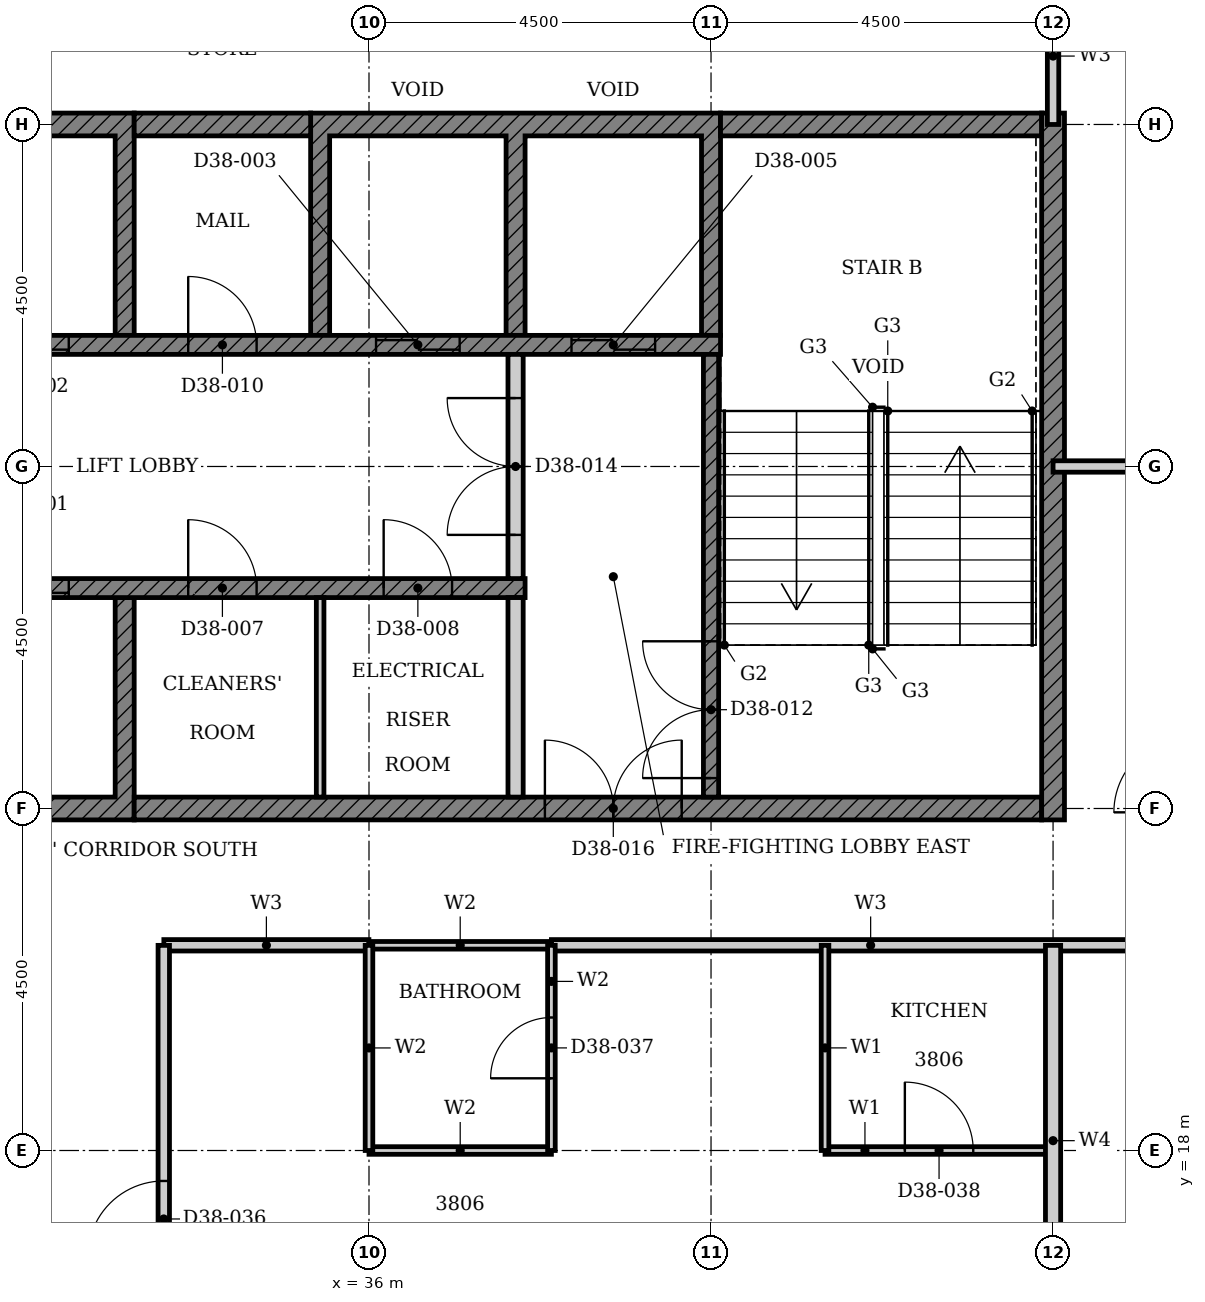
"""IFC4 building model, lengths in metres.
Left out: names, types, materials, properties, quantities, classifications, styles, units other than length and angle.
Written with IfcOpenShell. Run it as: python <this file> out.ifc"""

import sys

from ifc_helpers import new_model, si_unit, direction, frame, frame_2d, origin, place, context, subcontext, project, spatial, polyline, rectangle, outline, extrude, element, fill, save


model = new_model("IFC4")
c1 = context("Model", 3, precision=1e-05, world=origin(), true_north=direction((0.0, 1.0)))
c2 = subcontext(c1, "Body", "Model", "MODEL_VIEW")
j1 = project(units=[si_unit("LENGTHUNIT", "METRE"), si_unit("PLANEANGLEUNIT", "RADIAN")], contexts=[c1])
p1 = place(None, origin())
s1 = spatial("IfcSite", under=j1, at=p1, CompositionType="ELEMENT")
p2 = place(p1, origin())
s2 = spatial("IfcBuilding", under=s1, at=p2, CompositionType="ELEMENT")
p3 = place(p2, frame((0.0, 0.0, 154.3)))
s3 = spatial("IfcBuildingStorey", under=s2, at=p3, CompositionType="ELEMENT", Elevation=154.3)
p4 = place(p3, origin())
e1 = element("IfcWall", 1, at=p4, inside=s3, PredefinedType="SHEAR", context=c2, shape_type="SweptSolid", body=[
    extrude(outline(polyline([(27.518, 22.35), (32.911, 22.35), (32.911, 25.275), (32.661, 25.275), (32.661, 22.65), (30.339, 22.65), (30.339, 25.275), (30.089, 25.275), (30.089, 22.65), (27.768, 22.65), (27.768, 25.275), (27.518, 25.275), (27.518, 22.35)])), origin(), (0.0, 0.0, 1.0), 3.4),
])
p5 = place(p3, origin())
e2 = element("IfcWall", 2, at=p5, inside=s3, PredefinedType="SHEAR", context=c2, shape_type="SweptSolid", body=[
    extrude(outline(polyline([(27.518, 28.725), (27.768, 28.725), (27.768, 31.35), (30.089, 31.35), (30.089, 28.725), (30.339, 28.725), (30.339, 31.35), (32.661, 31.35), (32.661, 28.725), (32.911, 28.725), (32.911, 31.65), (27.518, 31.65), (27.518, 28.725)])), origin(), (0.0, 0.0, 1.0), 3.4),
])
p6 = place(p3, origin())
e3 = element("IfcWall", 3, at=p6, inside=s3, PredefinedType="SHEAR", context=c2, shape_type="SweptSolid", body=[
    extrude(outline(polyline([(35.232, 28.725), (35.482, 28.725), (35.482, 31.35), (37.803, 31.35), (37.803, 28.725), (38.053, 28.725), (38.053, 31.35), (40.375, 31.35), (40.375, 28.725), (40.625, 28.725), (40.625, 31.65), (35.232, 31.65), (35.232, 28.725)])), origin(), (0.0, 0.0, 1.0), 3.4),
])
p7 = place(p3, frame((32.911, 22.5, 0.0), z_axis=(0.0, 0.0, 1.0), x_axis=(1.0, 0.0, 0.0)))
e4 = element("IfcWall", 4, at=p7, inside=s3, PredefinedType="SHEAR", context=c2, shape_type="SweptSolid", body=[
    extrude(rectangle(XDim=11.939, YDim=0.3, at=frame_2d((5.97, 0.0))), origin(), (0.0, 0.0, 1.0), 3.4),
])
p8 = place(p7, frame((5.404, 0.0, 0.0)))
e5 = element("IfcOpeningElement", 5, at=p8, cuts=e4, PredefinedType="OPENING", context=c2, shape_type="SweptSolid", body=[
    extrude(rectangle(XDim=1.8, YDim=2.1, at=frame_2d((0.9, 1.05))), frame((0.0, 0.16, 0.0), z_axis=(0.0, -1.0, 0.0), x_axis=(1.0, 0.0, 0.0)), (0.0, 0.0, 1.0), 0.32),
])
p9 = place(p3, frame((32.911, 31.5, 0.0), z_axis=(0.0, 0.0, 1.0), x_axis=(1.0, 0.0, 0.0)))
e6 = element("IfcWall", 6, at=p9, inside=s3, PredefinedType="SHEAR", context=c2, shape_type="SweptSolid", body=[
    extrude(rectangle(XDim=2.322, YDim=0.3, at=frame_2d((1.161, 0.0))), origin(), (0.0, 0.0, 1.0), 3.4),
])
p10 = place(p3, frame((40.625, 31.5, 0.0), z_axis=(0.0, 0.0, 1.0), x_axis=(1.0, 0.0, 0.0)))
e7 = element("IfcWall", 7, at=p10, inside=s3, PredefinedType="SHEAR", context=c2, shape_type="SweptSolid", body=[
    extrude(rectangle(XDim=4.225, YDim=0.3, at=frame_2d((2.113, 0.0))), origin(), (0.0, 0.0, 1.0), 3.4),
])
p11 = place(p3, frame((45.0, 22.35, 0.0), z_axis=(0.0, 0.0, 1.0), x_axis=(0.0, 1.0, 0.0)))
e8 = element("IfcWall", 8, at=p11, inside=s3, PredefinedType="SHEAR", context=c2, shape_type="SweptSolid", body=[
    extrude(rectangle(XDim=9.3, YDim=0.3, at=frame_2d((4.65, 0.0))), origin(), (0.0, 0.0, 1.0), 3.4),
])
p12 = place(p3, frame((22.375, 25.4, 0.0), z_axis=(0.0, 0.0, 1.0), x_axis=(1.0, 0.0, 0.0)))
e9 = element("IfcWall", 9, at=p12, inside=s3, PredefinedType="SHEAR", context=c2, shape_type="SweptSolid", body=[
    extrude(rectangle(XDim=15.678, YDim=0.25, at=frame_2d((7.839, 0.0))), origin(), (0.0, 0.0, 1.0), 3.4),
])
p13 = place(p12, frame((8.575, 0.0, 0.0)))
e10 = element("IfcOpeningElement", 10, at=p13, cuts=e9, PredefinedType="OPENING", context=c2, shape_type="SweptSolid", body=[
    extrude(rectangle(XDim=1.1, YDim=2.1, at=frame_2d((0.55, 1.05))), frame((0.0, 0.135, 0.0), z_axis=(0.0, -1.0, 0.0), x_axis=(1.0, 0.0, 0.0)), (0.0, 0.0, 1.0), 0.27),
])
p14 = place(p12, frame((0.861, 0.0, 0.0)))
e11 = element("IfcOpeningElement", 11, at=p14, cuts=e9, PredefinedType="OPENING", context=c2, shape_type="SweptSolid", body=[
    extrude(rectangle(XDim=1.1, YDim=2.1, at=frame_2d((0.55, 1.05))), frame((0.0, 0.135, 0.0), z_axis=(0.0, -1.0, 0.0), x_axis=(1.0, 0.0, 0.0)), (0.0, 0.0, 1.0), 0.27),
])
p15 = place(p12, frame((3.532, 0.0, 0.0)))
e12 = element("IfcOpeningElement", 12, at=p15, cuts=e9, PredefinedType="OPENING", context=c2, shape_type="SweptSolid", body=[
    extrude(rectangle(XDim=0.9, YDim=2.1, at=frame_2d((0.45, 1.05))), frame((0.0, 0.135, 0.0), z_axis=(0.0, -1.0, 0.0), x_axis=(1.0, 0.0, 0.0)), (0.0, 0.0, 1.0), 0.27),
])
p16 = place(p12, frame((11.246, 0.0, 0.0)))
e13 = element("IfcOpeningElement", 13, at=p16, cuts=e9, PredefinedType="OPENING", context=c2, shape_type="SweptSolid", body=[
    extrude(rectangle(XDim=0.9, YDim=2.1, at=frame_2d((0.45, 1.05))), frame((0.0, 0.135, 0.0), z_axis=(0.0, -1.0, 0.0), x_axis=(1.0, 0.0, 0.0)), (0.0, 0.0, 1.0), 0.27),
])
p17 = place(p12, frame((13.818, 0.0, 0.0)))
e14 = element("IfcOpeningElement", 14, at=p17, cuts=e9, PredefinedType="OPENING", context=c2, shape_type="SweptSolid", body=[
    extrude(rectangle(XDim=0.9, YDim=2.1, at=frame_2d((0.45, 1.05))), frame((0.0, 0.135, 0.0), z_axis=(0.0, -1.0, 0.0), x_axis=(1.0, 0.0, 0.0)), (0.0, 0.0, 1.0), 0.27),
])
p18 = place(p3, frame((24.947, 28.6, 0.0), z_axis=(0.0, 0.0, 1.0), x_axis=(1.0, 0.0, 0.0)))
e15 = element("IfcWall", 15, at=p18, inside=s3, PredefinedType="SHEAR", context=c2, shape_type="SweptSolid", body=[
    extrude(rectangle(XDim=15.678, YDim=0.25, at=frame_2d((7.839, 0.0))), origin(), (0.0, 0.0, 1.0), 3.4),
])
p19 = place(p18, frame((6.004, 0.0, 0.0)))
e16 = element("IfcOpeningElement", 16, at=p19, cuts=e15, PredefinedType="OPENING", context=c2, shape_type="SweptSolid", body=[
    extrude(rectangle(XDim=1.1, YDim=2.1, at=frame_2d((0.55, 1.05))), frame((0.0, 0.135, 0.0), z_axis=(0.0, -1.0, 0.0), x_axis=(1.0, 0.0, 0.0)), (0.0, 0.0, 1.0), 0.27),
])
p20 = place(p18, frame((11.146, 0.0, 0.0)))
e17 = element("IfcOpeningElement", 17, at=p20, cuts=e15, PredefinedType="OPENING", context=c2, shape_type="SweptSolid", body=[
    extrude(rectangle(XDim=1.1, YDim=2.1, at=frame_2d((0.55, 1.05))), frame((0.0, 0.135, 0.0), z_axis=(0.0, -1.0, 0.0), x_axis=(1.0, 0.0, 0.0)), (0.0, 0.0, 1.0), 0.27),
])
p21 = place(p18, frame((13.718, 0.0, 0.0)))
e18 = element("IfcOpeningElement", 18, at=p21, cuts=e15, PredefinedType="OPENING", context=c2, shape_type="SweptSolid", body=[
    extrude(rectangle(XDim=1.1, YDim=2.1, at=frame_2d((0.55, 1.05))), frame((0.0, 0.135, 0.0), z_axis=(0.0, -1.0, 0.0), x_axis=(1.0, 0.0, 0.0)), (0.0, 0.0, 1.0), 0.27),
])
p22 = place(p18, frame((0.961, 0.0, 0.0)))
e19 = element("IfcOpeningElement", 19, at=p22, cuts=e15, PredefinedType="OPENING", context=c2, shape_type="SweptSolid", body=[
    extrude(rectangle(XDim=0.9, YDim=2.1, at=frame_2d((0.45, 1.05))), frame((0.0, 0.135, 0.0), z_axis=(0.0, -1.0, 0.0), x_axis=(1.0, 0.0, 0.0)), (0.0, 0.0, 1.0), 0.27),
])
p23 = place(p18, frame((8.675, 0.0, 0.0)))
e20 = element("IfcOpeningElement", 20, at=p23, cuts=e15, PredefinedType="OPENING", context=c2, shape_type="SweptSolid", body=[
    extrude(rectangle(XDim=0.9, YDim=2.1, at=frame_2d((0.45, 1.05))), frame((0.0, 0.135, 0.0), z_axis=(0.0, -1.0, 0.0), x_axis=(1.0, 0.0, 0.0)), (0.0, 0.0, 1.0), 0.27),
])
p24 = place(p3, frame((37.928, 22.65, 0.0), z_axis=(0.0, 0.0, 1.0), x_axis=(0.0, 1.0, 0.0)))
e21 = element("IfcWall", 21, at=p24, inside=s3, PredefinedType="PARTITIONING", context=c2, shape_type="SweptSolid", body=[
    extrude(rectangle(XDim=2.625, YDim=0.2, at=frame_2d((1.312, 0.0))), origin(), (0.0, 0.0, 1.0), 3.4),
])
p25 = place(p3, frame((35.357, 22.65, 0.0), z_axis=(0.0, 0.0, 1.0), x_axis=(0.0, 1.0, 0.0)))
e22 = element("IfcWall", 22, at=p25, inside=s3, PredefinedType="PARTITIONING", context=c2, shape_type="SweptSolid", body=[
    extrude(rectangle(XDim=2.625, YDim=0.1, at=frame_2d((1.312, 0.0))), origin(), (0.0, 0.0, 1.0), 3.4),
])
p26 = place(p3, frame((40.5, 22.65, 0.0), z_axis=(0.0, 0.0, 1.0), x_axis=(0.0, 1.0, 0.0)))
e23 = element("IfcWall", 23, at=p26, inside=s3, PredefinedType="SHEAR", context=c2, shape_type="SweptSolid", body=[
    extrude(rectangle(XDim=5.825, YDim=0.2, at=frame_2d((2.913, 0.0))), origin(), (0.0, 0.0, 1.0), 3.4),
])
p27 = place(p26, frame((0.25, 0.0, 0.0)))
e24 = element("IfcOpeningElement", 24, at=p27, cuts=e23, PredefinedType="OPENING", context=c2, shape_type="SweptSolid", body=[
    extrude(rectangle(XDim=1.8, YDim=2.1, at=frame_2d((0.9, 1.05))), frame((0.0, 0.11, 0.0), z_axis=(0.0, -1.0, 0.0), x_axis=(1.0, 0.0, 0.0)), (0.0, 0.0, 1.0), 0.22),
])
p28 = place(p3, frame((37.928, 25.525, 0.0), z_axis=(0.0, 0.0, 1.0), x_axis=(0.0, 1.0, 0.0)))
e25 = element("IfcWall", 25, at=p28, inside=s3, PredefinedType="PARTITIONING", context=c2, shape_type="SweptSolid", body=[
    extrude(rectangle(XDim=2.95, YDim=0.2, at=frame_2d((1.475, 0.0))), origin(), (0.0, 0.0, 1.0), 3.4),
])
p29 = place(p28, frame((0.575, 0.0, 0.0)))
e26 = element("IfcOpeningElement", 26, at=p29, cuts=e25, PredefinedType="OPENING", context=c2, shape_type="SweptSolid", body=[
    extrude(rectangle(XDim=1.8, YDim=2.1, at=frame_2d((0.9, 1.05))), frame((0.0, 0.11, 0.0), z_axis=(0.0, -1.0, 0.0), x_axis=(1.0, 0.0, 0.0)), (0.0, 0.0, 1.0), 0.22),
])
p30 = place(p3, frame((33.301, 20.7, 0.0), z_axis=(0.0, 0.0, 1.0), x_axis=(1.0, 0.0, 0.0)))
e27 = element("IfcWall", 27, at=p30, inside=s3, PredefinedType="PARTITIONING", context=c2, shape_type="SweptSolid", body=[
    extrude(rectangle(XDim=2.698, YDim=0.15, at=frame_2d((1.349, 0.0))), origin(), (0.0, 0.0, 1.0), 3.4),
])
p31 = place(p3, frame((38.4, 20.7, 0.0), z_axis=(0.0, 0.0, 1.0), x_axis=(1.0, 0.0, 0.0)))
e28 = element("IfcWall", 28, at=p31, inside=s3, PredefinedType="PARTITIONING", context=c2, shape_type="SweptSolid", body=[
    extrude(rectangle(XDim=8.4, YDim=0.15, at=frame_2d((4.2, 0.0))), origin(), (0.0, 0.0, 1.0), 3.4),
])
p32 = place(p3, frame((45.0, 27.0, 0.0), z_axis=(0.0, 0.0, 1.0), x_axis=(1.0, 0.0, 0.0)))
e29 = element("IfcWall", 29, at=p32, inside=s3, PredefinedType="PARTITIONING", context=c2, shape_type="SweptSolid", body=[
    extrude(rectangle(XDim=13.5, YDim=0.15, at=frame_2d((6.75, 0.0))), origin(), (0.0, 0.0, 1.0), 2.68),
])
p33 = place(p32, frame((7.15, 0.0, 0.0)))
e30 = element("IfcOpeningElement", 30, at=p33, cuts=e29, PredefinedType="OPENING", context=c2, shape_type="SweptSolid", body=[
    extrude(rectangle(XDim=1.0, YDim=2.1, at=frame_2d((0.5, 1.05))), frame((0.0, 0.085, 0.0), z_axis=(0.0, -1.0, 0.0), x_axis=(1.0, 0.0, 0.0)), (0.0, 0.0, 1.0), 0.17),
])
p34 = place(p3, frame((33.3, 6.9, 0.0), z_axis=(0.0, 0.0, 1.0), x_axis=(0.0, 1.0, 0.0)))
e31 = element("IfcWall", 31, at=p34, inside=s3, PredefinedType="PARTITIONING", context=c2, shape_type="SweptSolid", body=[
    extrude(rectangle(XDim=13.799, YDim=0.15, at=frame_2d((6.899, 0.0))), origin(), (0.0, 0.0, 1.0), 3.4),
])
p35 = place(p34, frame((9.699, 0.0, 0.0)))
e32 = element("IfcOpeningElement", 32, at=p35, cuts=e31, PredefinedType="OPENING", context=c2, shape_type="SweptSolid", body=[
    extrude(rectangle(XDim=1.0, YDim=2.2, at=frame_2d((0.5, 1.1))), frame((0.0, 0.085, 0.0), z_axis=(0.0, -1.0, 0.0), x_axis=(1.0, 0.0, 0.0)), (0.0, 0.0, 1.0), 0.17),
])
p36 = place(p34, frame((1.3, 0.0, 0.0)))
e33 = element("IfcOpeningElement", 33, at=p36, cuts=e31, PredefinedType="OPENING", context=c2, shape_type="SweptSolid", body=[
    extrude(rectangle(XDim=1.0, YDim=2.2, at=frame_2d((0.5, 1.1))), frame((0.0, 0.085, 0.0), z_axis=(0.0, -1.0, 0.0), x_axis=(1.0, 0.0, 0.0)), (0.0, 0.0, 1.0), 0.17),
])
p37 = place(p3, frame((45.0, 31.5, 0.0), z_axis=(0.0, 0.0, 1.0), x_axis=(0.0, 1.0, 0.0)))
e34 = element("IfcWall", 34, at=p37, inside=s3, PredefinedType="PARTITIONING", context=c2, shape_type="SweptSolid", body=[
    extrude(rectangle(XDim=1.8, YDim=0.15, at=frame_2d((0.9, 0.0))), origin(), (0.0, 0.0, 1.0), 3.4),
])
p38 = place(p3, frame((42.0, 18.0, 0.0), z_axis=(0.0, 0.0, 1.0), x_axis=(1.0, 0.0, 0.0)))
e35 = element("IfcWall", 35, at=p38, inside=s3, PredefinedType="PARTITIONING", context=c2, shape_type="SweptSolid", body=[
    extrude(rectangle(XDim=3.0, YDim=0.1, at=frame_2d((1.5, 0.0))), origin(), (0.0, 0.0, 1.0), 3.4),
])
p39 = place(p38, frame((1.05, 0.0, 0.0)))
e36 = element("IfcOpeningElement", 36, at=p39, cuts=e35, PredefinedType="OPENING", context=c2, shape_type="SweptSolid", body=[
    extrude(rectangle(XDim=0.9, YDim=2.1, at=frame_2d((0.45, 1.05))), frame((0.0, 0.06, 0.0), z_axis=(0.0, -1.0, 0.0), x_axis=(1.0, 0.0, 0.0)), (0.0, 0.0, 1.0), 0.12),
])
p40 = place(p3, frame((42.0, 18.0, 0.0), z_axis=(0.0, 0.0, 1.0), x_axis=(0.0, 1.0, 0.0)))
e37 = element("IfcWall", 37, at=p40, inside=s3, PredefinedType="PARTITIONING", context=c2, shape_type="SweptSolid", body=[
    extrude(rectangle(XDim=2.7, YDim=0.1, at=frame_2d((1.35, 0.0))), origin(), (0.0, 0.0, 1.0), 3.4),
])
p41 = place(p3, frame((45.0, 15.56, 0.0), z_axis=(0.0, 0.0, 1.0), x_axis=(0.0, 1.0, 0.0)))
e38 = element("IfcWall", 38, at=p41, inside=s3, PredefinedType="PARTITIONING", context=c2, shape_type="SweptSolid", body=[
    extrude(rectangle(XDim=5.139, YDim=0.2, at=frame_2d((2.569, 0.0))), origin(), (0.0, 0.0, 1.0), 3.4),
])
for number, where, z_axis, x_axis in (
    (39, (36.0, 18.0, 0.0), (0.0, 0.0, 1.0), (1.0, 0.0, 0.0)),
    (40, (36.0, 20.7, 0.0), (0.0, 0.0, 1.0), (1.0, 0.0, 0.0)),
):
    element("IfcWall", number, at=place(p3, frame(where, z_axis=z_axis, x_axis=x_axis)), inside=s3, PredefinedType="PARTITIONING", context=c2, shape_type="SweptSolid", body=[
        extrude(rectangle(XDim=2.4, YDim=0.1, at=frame_2d((1.2, 0.0))), origin(), (0.0, 0.0, 1.0), 3.4),
    ])
p42 = place(p3, frame((36.0, 18.0, 0.0), z_axis=(0.0, 0.0, 1.0), x_axis=(0.0, 1.0, 0.0)))
e41 = element("IfcWall", 41, at=p42, inside=s3, PredefinedType="PARTITIONING", context=c2, shape_type="SweptSolid", body=[
    extrude(rectangle(XDim=2.699, YDim=0.1, at=frame_2d((1.35, 0.0))), origin(), (0.0, 0.0, 1.0), 3.4),
])
p43 = place(p3, frame((38.4, 18.0, 0.0), z_axis=(0.0, 0.0, 1.0), x_axis=(0.0, 1.0, 0.0)))
e42 = element("IfcWall", 42, at=p43, inside=s3, PredefinedType="PARTITIONING", context=c2, shape_type="SweptSolid", body=[
    extrude(rectangle(XDim=2.7, YDim=0.1, at=frame_2d((1.35, 0.0))), origin(), (0.0, 0.0, 1.0), 3.4),
])
p44 = place(p43, frame((0.95, 0.0, 0.0)))
e43 = element("IfcOpeningElement", 43, at=p44, cuts=e42, PredefinedType="OPENING", context=c2, shape_type="SweptSolid", body=[
    extrude(rectangle(XDim=0.8, YDim=2.1, at=frame_2d((0.4, 1.05))), frame((0.0, 0.06, 0.0), z_axis=(0.0, -1.0, 0.0), x_axis=(1.0, 0.0, 0.0)), (0.0, 0.0, 1.0), 0.12),
])
p45 = place(p13, origin())
e44 = element("IfcDoor", 44, at=p45, inside=s3, OperationType="DOUBLE_DOOR_SLIDING", PredefinedType="DOOR", context=c2, shape_type="SweptSolid", body=[
    extrude(rectangle(XDim=1.1, YDim=2.1, at=frame_2d((0.55, 1.05))), frame((0.0, 0.025, 0.0), z_axis=(0.0, -1.0, 0.0), x_axis=(1.0, 0.0, 0.0)), (0.0, 0.0, 1.0), 0.05),
])
fill(e10, e44)
p46 = place(p19, origin())
e45 = element("IfcDoor", 45, at=p46, inside=s3, OperationType="DOUBLE_DOOR_SLIDING", PredefinedType="DOOR", context=c2, shape_type="SweptSolid", body=[
    extrude(rectangle(XDim=1.1, YDim=2.1, at=frame_2d((0.55, 1.05))), frame((0.0, 0.025, 0.0), z_axis=(0.0, -1.0, 0.0), x_axis=(1.0, 0.0, 0.0)), (0.0, 0.0, 1.0), 0.05),
])
fill(e16, e45)
p47 = place(p20, origin())
e46 = element("IfcDoor", 46, at=p47, inside=s3, OperationType="DOUBLE_DOOR_SLIDING", PredefinedType="DOOR", context=c2, shape_type="SweptSolid", body=[
    extrude(rectangle(XDim=1.1, YDim=2.1, at=frame_2d((0.55, 1.05))), frame((0.0, 0.025, 0.0), z_axis=(0.0, -1.0, 0.0), x_axis=(1.0, 0.0, 0.0)), (0.0, 0.0, 1.0), 0.05),
])
fill(e17, e46)
p48 = place(p21, origin())
e47 = element("IfcDoor", 47, at=p48, inside=s3, OperationType="DOUBLE_DOOR_SLIDING", PredefinedType="DOOR", context=c2, shape_type="SweptSolid", body=[
    extrude(rectangle(XDim=1.1, YDim=2.1, at=frame_2d((0.55, 1.05))), frame((0.0, 0.025, 0.0), z_axis=(0.0, -1.0, 0.0), x_axis=(1.0, 0.0, 0.0)), (0.0, 0.0, 1.0), 0.05),
])
fill(e18, e47)
p49 = place(p16, origin())
e48 = element("IfcDoor", 48, at=p49, inside=s3, OperationType="SINGLE_SWING_LEFT", PredefinedType="DOOR", context=c2, shape_type="SweptSolid", body=[
    extrude(rectangle(XDim=0.9, YDim=2.1, at=frame_2d((0.45, 1.05))), frame((0.0, 0.025, 0.0), z_axis=(0.0, -1.0, 0.0), x_axis=(1.0, 0.0, 0.0)), (0.0, 0.0, 1.0), 0.05),
])
fill(e13, e48)
p50 = place(p17, origin())
e49 = element("IfcDoor", 49, at=p50, inside=s3, OperationType="SINGLE_SWING_LEFT", PredefinedType="DOOR", context=c2, shape_type="SweptSolid", body=[
    extrude(rectangle(XDim=0.9, YDim=2.1, at=frame_2d((0.45, 1.05))), frame((0.0, 0.025, 0.0), z_axis=(0.0, -1.0, 0.0), x_axis=(1.0, 0.0, 0.0)), (0.0, 0.0, 1.0), 0.05),
])
fill(e14, e49)
p51 = place(p23, origin())
e50 = element("IfcDoor", 50, at=p51, inside=s3, OperationType="SINGLE_SWING_LEFT", PredefinedType="DOOR", context=c2, shape_type="SweptSolid", body=[
    extrude(rectangle(XDim=0.9, YDim=2.1, at=frame_2d((0.45, 1.05))), frame((0.0, 0.025, 0.0), z_axis=(0.0, -1.0, 0.0), x_axis=(1.0, 0.0, 0.0)), (0.0, 0.0, 1.0), 0.05),
])
fill(e20, e50)
p52 = place(p27, origin())
e51 = element("IfcDoor", 51, at=p52, inside=s3, OperationType="DOUBLE_DOOR_SINGLE_SWING", PredefinedType="DOOR", context=c2, shape_type="SweptSolid", body=[
    extrude(rectangle(XDim=1.8, YDim=2.1, at=frame_2d((0.9, 1.05))), frame((0.0, 0.025, 0.0), z_axis=(0.0, -1.0, 0.0), x_axis=(1.0, 0.0, 0.0)), (0.0, 0.0, 1.0), 0.05),
])
fill(e24, e51)
p53 = place(p29, origin())
e52 = element("IfcDoor", 52, at=p53, inside=s3, OperationType="DOUBLE_DOOR_SINGLE_SWING", PredefinedType="DOOR", context=c2, shape_type="SweptSolid", body=[
    extrude(rectangle(XDim=1.8, YDim=2.1, at=frame_2d((0.9, 1.05))), frame((0.0, 0.025, 0.0), z_axis=(0.0, -1.0, 0.0), x_axis=(1.0, 0.0, 0.0)), (0.0, 0.0, 1.0), 0.05),
])
fill(e26, e52)
p54 = place(p8, origin())
e53 = element("IfcDoor", 53, at=p54, inside=s3, OperationType="DOUBLE_DOOR_SINGLE_SWING", PredefinedType="DOOR", context=c2, shape_type="SweptSolid", body=[
    extrude(rectangle(XDim=1.8, YDim=2.1, at=frame_2d((0.9, 1.05))), frame((0.0, 0.025, 0.0), z_axis=(0.0, -1.0, 0.0), x_axis=(1.0, 0.0, 0.0)), (0.0, 0.0, 1.0), 0.05),
])
fill(e5, e53)
p55 = place(p35, origin())
e54 = element("IfcDoor", 54, at=p55, inside=s3, OperationType="SINGLE_SWING_LEFT", PredefinedType="DOOR", context=c2, shape_type="SweptSolid", body=[
    extrude(rectangle(XDim=1.0, YDim=2.2, at=frame_2d((0.5, 1.1))), frame((0.0, 0.025, 0.0), z_axis=(0.0, -1.0, 0.0), x_axis=(1.0, 0.0, 0.0)), (0.0, 0.0, 1.0), 0.05),
])
fill(e32, e54)
p56 = place(p44, origin())
e55 = element("IfcDoor", 55, at=p56, inside=s3, OperationType="SINGLE_SWING_LEFT", PredefinedType="DOOR", context=c2, shape_type="SweptSolid", body=[
    extrude(rectangle(XDim=0.8, YDim=2.1, at=frame_2d((0.4, 1.05))), frame((0.0, 0.025, 0.0), z_axis=(0.0, -1.0, 0.0), x_axis=(1.0, 0.0, 0.0)), (0.0, 0.0, 1.0), 0.05),
])
fill(e43, e55)
p57 = place(p39, origin())
e56 = element("IfcDoor", 56, at=p57, inside=s3, OperationType="SINGLE_SWING_LEFT", PredefinedType="DOOR", context=c2, shape_type="SweptSolid", body=[
    extrude(rectangle(XDim=0.9, YDim=2.1, at=frame_2d((0.45, 1.05))), frame((0.0, 0.025, 0.0), z_axis=(0.0, -1.0, 0.0), x_axis=(1.0, 0.0, 0.0)), (0.0, 0.0, 1.0), 0.05),
])
fill(e36, e56)
save(model, sys.argv[1])
